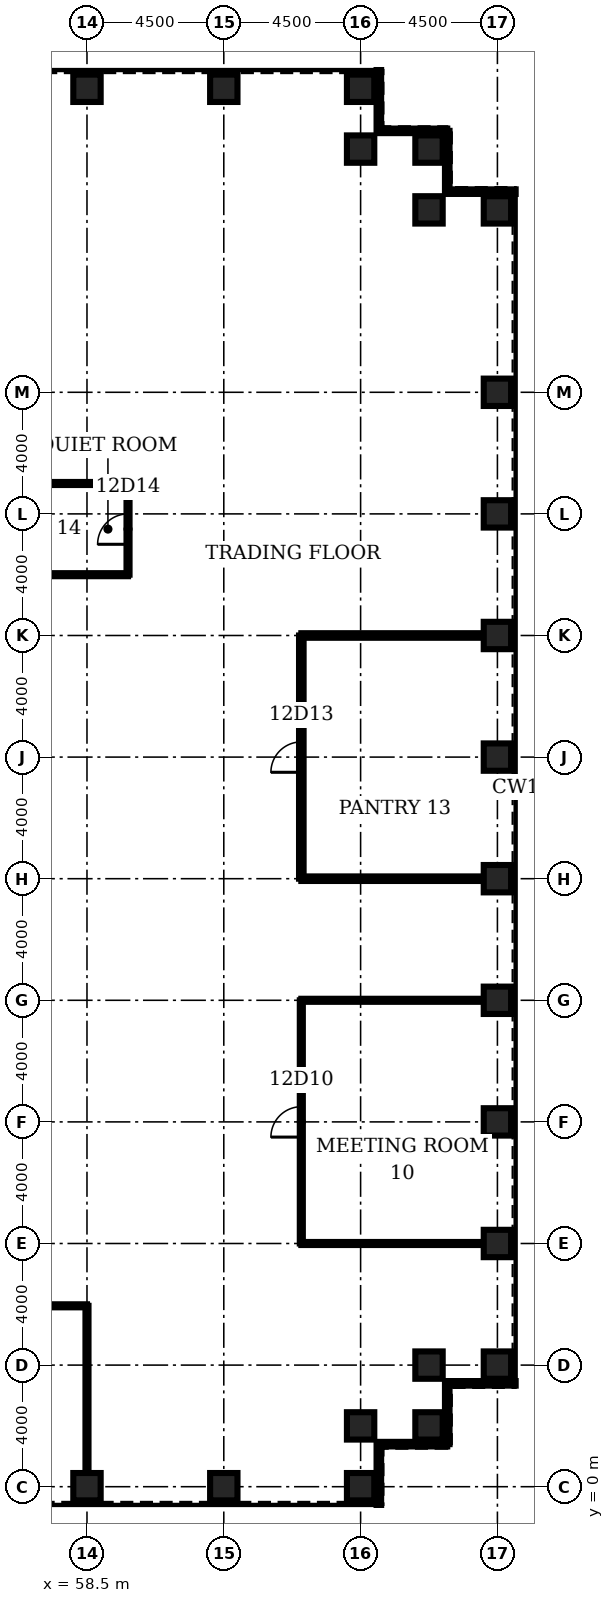
"""IFC4 building model, lengths in metres.
Left out: names, types, materials, properties, quantities, classifications, styles, units other than length and angle.
Written with IfcOpenShell. Run it as: python <this file> out.ifc"""

import sys

from ifc_helpers import new_model, si_unit, direction, frame, frame_2d, origin, origin_2d, place, context, subcontext, project, spatial, rectangle, hollow_rectangle, extrude, element, fill, save


model = new_model("IFC4")
c1 = context("Model", 3, precision=1e-05, world=origin(), true_north=direction((0.0, 1.0)))
c2 = subcontext(c1, "Body", "Model", "MODEL_VIEW")
j1 = project(units=[si_unit("LENGTHUNIT", "METRE"), si_unit("PLANEANGLEUNIT", "RADIAN")], contexts=[c1])
p1 = place(None, origin())
s1 = spatial("IfcSite", under=j1, at=p1, CompositionType="ELEMENT")
p2 = place(p1, origin())
s2 = spatial("IfcBuilding", under=s1, at=p2, CompositionType="ELEMENT")
p3 = place(p2, frame((0.0, 0.0, 59.0)))
s3 = spatial("IfcBuildingStorey", under=s2, at=p3, CompositionType="ELEMENT", Elevation=59.0)
for number, where, z_axis, x_axis in (
    (1, (58.5, 0.0, 0.0), (0.0, 0.0, 1.0), (0.0, 1.0, 0.0)),
    (2, (63.0, 0.0, 0.0), (0.0, 0.0, 1.0), (0.0, 1.0, 0.0)),
    (3, (67.5, 0.0, 0.0), (0.0, 0.0, 1.0), (0.0, 1.0, 0.0)),
    (4, (67.5, 2.0, 0.0), (0.0, 0.0, 1.0), (0.0, 1.0, 0.0)),
    (5, (69.75, 2.0, 0.0), (0.0, 0.0, 1.0), (1.0, 0.0, 0.0)),
    (6, (69.75, 4.0, 0.0), (0.0, 0.0, 1.0), (1.0, 0.0, 0.0)),
    (7, (72.0, 4.0, 0.0), (0.0, 0.0, 1.0), (1.0, 0.0, 0.0)),
    (8, (72.0, 8.0, 0.0), (0.0, 0.0, 1.0), (1.0, 0.0, 0.0)),
    (9, (72.0, 12.0, 0.0), (0.0, 0.0, 1.0), (1.0, 0.0, 0.0)),
    (10, (72.0, 16.0, 0.0), (0.0, 0.0, 1.0), (1.0, 0.0, 0.0)),
    (11, (72.0, 20.0, 0.0), (0.0, 0.0, 1.0), (1.0, 0.0, 0.0)),
    (12, (72.0, 24.0, 0.0), (0.0, 0.0, 1.0), (1.0, 0.0, 0.0)),
    (13, (72.0, 28.0, 0.0), (0.0, 0.0, 1.0), (1.0, 0.0, 0.0)),
    (14, (72.0, 32.0, 0.0), (0.0, 0.0, 1.0), (1.0, 0.0, 0.0)),
    (15, (72.0, 36.0, 0.0), (0.0, 0.0, 1.0), (1.0, 0.0, 0.0)),
    (16, (72.0, 42.0, 0.0), (0.0, 0.0, 1.0), (1.0, 0.0, 0.0)),
    (17, (69.75, 42.0, 0.0), (0.0, 0.0, 1.0), (1.0, 0.0, 0.0)),
    (18, (69.75, 44.0, 0.0), (0.0, 0.0, 1.0), (1.0, 0.0, 0.0)),
    (19, (67.5, 44.0, 0.0), (0.0, 0.0, 1.0), (0.0, 1.0, 0.0)),
    (20, (67.5, 46.0, 0.0), (0.0, 0.0, 1.0), (0.0, 1.0, 0.0)),
    (21, (63.0, 46.0, 0.0), (0.0, 0.0, 1.0), (0.0, 1.0, 0.0)),
    (22, (58.5, 46.0, 0.0), (0.0, 0.0, 1.0), (0.0, 1.0, 0.0)),
):
    element("IfcColumn", number, at=place(p3, frame(where, z_axis=z_axis, x_axis=x_axis)), inside=s3, PredefinedType="COLUMN", context=c2, shape_type="SweptSolid", body=[
        extrude(hollow_rectangle(XDim=0.9, YDim=0.9, WallThickness=0.12, at=origin_2d()), origin(), (0.0, 0.0, 1.0), 4.5),
    ])
p4 = place(p3, frame((49.5, 5.95, 0.0), z_axis=(0.0, 0.0, 1.0), x_axis=(1.0, 0.0, 0.0)))
e23 = element("IfcWall", 23, at=p4, inside=s3, PredefinedType="PARTITIONING", context=c2, shape_type="SweptSolid", body=[
    extrude(rectangle(XDim=9.0, YDim=0.1, at=frame_2d((4.5, 0.0))), origin(), (0.0, 0.0, 1.0), 3.0),
])
p5 = place(p4, frame((4.0, 0.0, 0.0)))
e24 = element("IfcOpeningElement", 24, at=p5, cuts=e23, PredefinedType="OPENING", context=c2, shape_type="SweptSolid", body=[
    extrude(rectangle(XDim=1.0, YDim=2.1, at=frame_2d((0.5, 1.05))), frame((0.0, 0.06, 0.0), z_axis=(0.0, -1.0, 0.0), x_axis=(1.0, 0.0, 0.0)), (0.0, 0.0, 1.0), 0.12),
])
for number, where, z_axis, x_axis in (
    (25, (65.55, 8.0, 0.0), (0.0, 0.0, 1.0), (1.0, 0.0, 0.0)),
    (26, (65.55, 16.0, 0.0), (0.0, 0.0, 1.0), (1.0, 0.0, 0.0)),
):
    element("IfcWall", number, at=place(p3, frame(where, z_axis=z_axis, x_axis=x_axis)), inside=s3, PredefinedType="PARTITIONING", context=c2, shape_type="SweptSolid", body=[
        extrude(rectangle(XDim=6.0, YDim=0.1, at=frame_2d((3.0, 0.0))), origin(), (0.0, 0.0, 1.0), 3.0),
    ])
for number, where, z_axis, x_axis in (
    (27, (65.55, 20.0, 0.0), (0.0, 0.0, 1.0), (1.0, 0.0, 0.0)),
    (28, (65.55, 28.0, 0.0), (0.0, 0.0, 1.0), (1.0, 0.0, 0.0)),
):
    element("IfcWall", number, at=place(p3, frame(where, z_axis=z_axis, x_axis=x_axis)), inside=s3, PredefinedType="PARTITIONING", context=c2, shape_type="SweptSolid", body=[
        extrude(rectangle(XDim=6.0, YDim=0.15, at=frame_2d((3.0, 0.0))), origin(), (0.0, 0.0, 1.0), 3.0),
    ])
for number, where, z_axis, x_axis in (
    (29, (56.85, 30.0, 0.0), (0.0, 0.0, 1.0), (1.0, 0.0, 0.0)),
    (30, (56.85, 33.0, 0.0), (0.0, 0.0, 1.0), (1.0, 0.0, 0.0)),
):
    element("IfcWall", number, at=place(p3, frame(where, z_axis=z_axis, x_axis=x_axis)), inside=s3, PredefinedType="PARTITIONING", context=c2, shape_type="SweptSolid", body=[
        extrude(rectangle(XDim=3.0, YDim=0.1, at=frame_2d((1.5, 0.0))), origin(), (0.0, 0.0, 1.0), 3.0),
    ])
p6 = place(p3, frame((58.5, 0.45, 0.0), z_axis=(0.0, 0.0, 1.0), x_axis=(0.0, 1.0, 0.0)))
e31 = element("IfcWall", 31, at=p6, inside=s3, PredefinedType="PARTITIONING", context=c2, shape_type="SweptSolid", body=[
    extrude(rectangle(XDim=5.5, YDim=0.1, at=frame_2d((2.75, 0.0))), origin(), (0.0, 0.0, 1.0), 3.0),
])
p7 = place(p3, frame((59.85, 30.0, 0.0), z_axis=(0.0, 0.0, 1.0), x_axis=(0.0, 1.0, 0.0)))
e32 = element("IfcWall", 32, at=p7, inside=s3, PredefinedType="PARTITIONING", context=c2, shape_type="SweptSolid", body=[
    extrude(rectangle(XDim=3.0, YDim=0.1, at=frame_2d((1.5, 0.0))), origin(), (0.0, 0.0, 1.0), 3.0),
])
p8 = place(p7, frame((1.0, 0.0, 0.0)))
e33 = element("IfcOpeningElement", 33, at=p8, cuts=e32, PredefinedType="OPENING", context=c2, shape_type="SweptSolid", body=[
    extrude(rectangle(XDim=1.0, YDim=2.1, at=frame_2d((0.5, 1.05))), frame((0.0, 0.06, 0.0), z_axis=(0.0, -1.0, 0.0), x_axis=(1.0, 0.0, 0.0)), (0.0, 0.0, 1.0), 0.12),
])
p9 = place(p3, frame((65.55, 8.0, 0.0), z_axis=(0.0, 0.0, 1.0), x_axis=(0.0, 1.0, 0.0)))
e34 = element("IfcWall", 34, at=p9, inside=s3, PredefinedType="PARTITIONING", context=c2, shape_type="SweptSolid", body=[
    extrude(rectangle(XDim=8.0, YDim=0.1, at=frame_2d((4.0, 0.0))), origin(), (0.0, 0.0, 1.0), 3.0),
])
p10 = place(p9, frame((3.5, 0.0, 0.0)))
e35 = element("IfcOpeningElement", 35, at=p10, cuts=e34, PredefinedType="OPENING", context=c2, shape_type="SweptSolid", body=[
    extrude(rectangle(XDim=1.0, YDim=2.1, at=frame_2d((0.5, 1.05))), frame((0.0, 0.06, 0.0), z_axis=(0.0, -1.0, 0.0), x_axis=(1.0, 0.0, 0.0)), (0.0, 0.0, 1.0), 0.12),
])
p11 = place(p3, frame((65.55, 20.0, 0.0), z_axis=(0.0, 0.0, 1.0), x_axis=(0.0, 1.0, 0.0)))
e36 = element("IfcWall", 36, at=p11, inside=s3, PredefinedType="PARTITIONING", context=c2, shape_type="SweptSolid", body=[
    extrude(rectangle(XDim=8.0, YDim=0.15, at=frame_2d((4.0, 0.0))), origin(), (0.0, 0.0, 1.0), 3.0),
])
p12 = place(p11, frame((3.5, 0.0, 0.0)))
e37 = element("IfcOpeningElement", 37, at=p12, cuts=e36, PredefinedType="OPENING", context=c2, shape_type="SweptSolid", body=[
    extrude(rectangle(XDim=1.0, YDim=2.1, at=frame_2d((0.5, 1.05))), frame((0.0, 0.085, 0.0), z_axis=(0.0, -1.0, 0.0), x_axis=(1.0, 0.0, 0.0)), (0.0, 0.0, 1.0), 0.17),
])
p13 = place(p3, frame((68.1, -0.6, 0.0), z_axis=(0.0, 0.0, 1.0), x_axis=(0.0, 1.0, 0.0)))
e38 = element("IfcWall", 38, at=p13, inside=s3, PredefinedType="ELEMENTEDWALL", context=c2, shape_type="SweptSolid", body=[
    extrude(rectangle(XDim=2.0, YDim=0.15, at=frame_2d((1.0, 0.0))), origin(), (0.0, 0.0, 1.0), 4.32),
])
p14 = place(p3, frame((68.1, 1.4, 0.0), z_axis=(0.0, 0.0, 1.0), x_axis=(1.0, 0.0, 0.0)))
e39 = element("IfcWall", 39, at=p14, inside=s3, PredefinedType="ELEMENTEDWALL", context=c2, shape_type="SweptSolid", body=[
    extrude(rectangle(XDim=2.25, YDim=0.15, at=frame_2d((1.125, 0.0))), origin(), (0.0, 0.0, 1.0), 4.32),
])
p15 = place(p3, frame((70.35, 1.4, 0.0), z_axis=(0.0, 0.0, 1.0), x_axis=(0.0, 1.0, 0.0)))
e40 = element("IfcWall", 40, at=p15, inside=s3, PredefinedType="ELEMENTEDWALL", context=c2, shape_type="SweptSolid", body=[
    extrude(rectangle(XDim=2.0, YDim=0.15, at=frame_2d((1.0, 0.0))), origin(), (0.0, 0.0, 1.0), 4.32),
])
for number, where, z_axis, x_axis in (
    (41, (70.35, 3.4, 0.0), (0.0, 0.0, 1.0), (1.0, 0.0, 0.0)),
    (42, (72.6, 42.6, 0.0), (0.0, 0.0, 1.0), (-1.0, 0.0, 0.0)),
):
    element("IfcWall", number, at=place(p3, frame(where, z_axis=z_axis, x_axis=x_axis)), inside=s3, PredefinedType="ELEMENTEDWALL", context=c2, shape_type="SweptSolid", body=[
        extrude(rectangle(XDim=2.25, YDim=0.15, at=frame_2d((1.125, 0.0))), origin(), (0.0, 0.0, 1.0), 4.32),
    ])
p16 = place(p3, frame((70.35, 42.6, 0.0), z_axis=(0.0, 0.0, 1.0), x_axis=(0.0, 1.0, 0.0)))
e43 = element("IfcWall", 43, at=p16, inside=s3, PredefinedType="ELEMENTEDWALL", context=c2, shape_type="SweptSolid", body=[
    extrude(rectangle(XDim=2.0, YDim=0.15, at=frame_2d((1.0, 0.0))), origin(), (0.0, 0.0, 1.0), 4.32),
])
p17 = place(p3, frame((70.35, 44.6, 0.0), z_axis=(0.0, 0.0, 1.0), x_axis=(-1.0, 0.0, 0.0)))
e44 = element("IfcWall", 44, at=p17, inside=s3, PredefinedType="ELEMENTEDWALL", context=c2, shape_type="SweptSolid", body=[
    extrude(rectangle(XDim=2.25, YDim=0.15, at=frame_2d((1.125, 0.0))), origin(), (0.0, 0.0, 1.0), 4.32),
])
p18 = place(p3, frame((68.1, 44.6, 0.0), z_axis=(0.0, 0.0, 1.0), x_axis=(0.0, 1.0, 0.0)))
e45 = element("IfcWall", 45, at=p18, inside=s3, PredefinedType="ELEMENTEDWALL", context=c2, shape_type="SweptSolid", body=[
    extrude(rectangle(XDim=2.0, YDim=0.15, at=frame_2d((1.0, 0.0))), origin(), (0.0, 0.0, 1.0), 4.32),
])
p19 = place(p10, origin())
e46 = element("IfcDoor", 46, at=p19, inside=s3, OperationType="SINGLE_SWING_LEFT", PredefinedType="DOOR", context=c2, shape_type="SweptSolid", body=[
    extrude(rectangle(XDim=1.0, YDim=2.1, at=frame_2d((0.5, 1.05))), frame((0.0, 0.025, 0.0), z_axis=(0.0, -1.0, 0.0), x_axis=(1.0, 0.0, 0.0)), (0.0, 0.0, 1.0), 0.05),
])
fill(e35, e46)
p20 = place(p12, origin())
e47 = element("IfcDoor", 47, at=p20, inside=s3, OperationType="SINGLE_SWING_LEFT", PredefinedType="DOOR", context=c2, shape_type="SweptSolid", body=[
    extrude(rectangle(XDim=1.0, YDim=2.1, at=frame_2d((0.5, 1.05))), frame((0.0, 0.025, 0.0), z_axis=(0.0, -1.0, 0.0), x_axis=(1.0, 0.0, 0.0)), (0.0, 0.0, 1.0), 0.05),
])
fill(e37, e47)
p21 = place(p8, origin())
e48 = element("IfcDoor", 48, at=p21, inside=s3, OperationType="SINGLE_SWING_LEFT", PredefinedType="DOOR", context=c2, shape_type="SweptSolid", body=[
    extrude(rectangle(XDim=1.0, YDim=2.1, at=frame_2d((0.5, 1.05))), frame((0.0, 0.025, 0.0), z_axis=(0.0, -1.0, 0.0), x_axis=(1.0, 0.0, 0.0)), (0.0, 0.0, 1.0), 0.05),
])
fill(e33, e48)
save(model, sys.argv[1])
